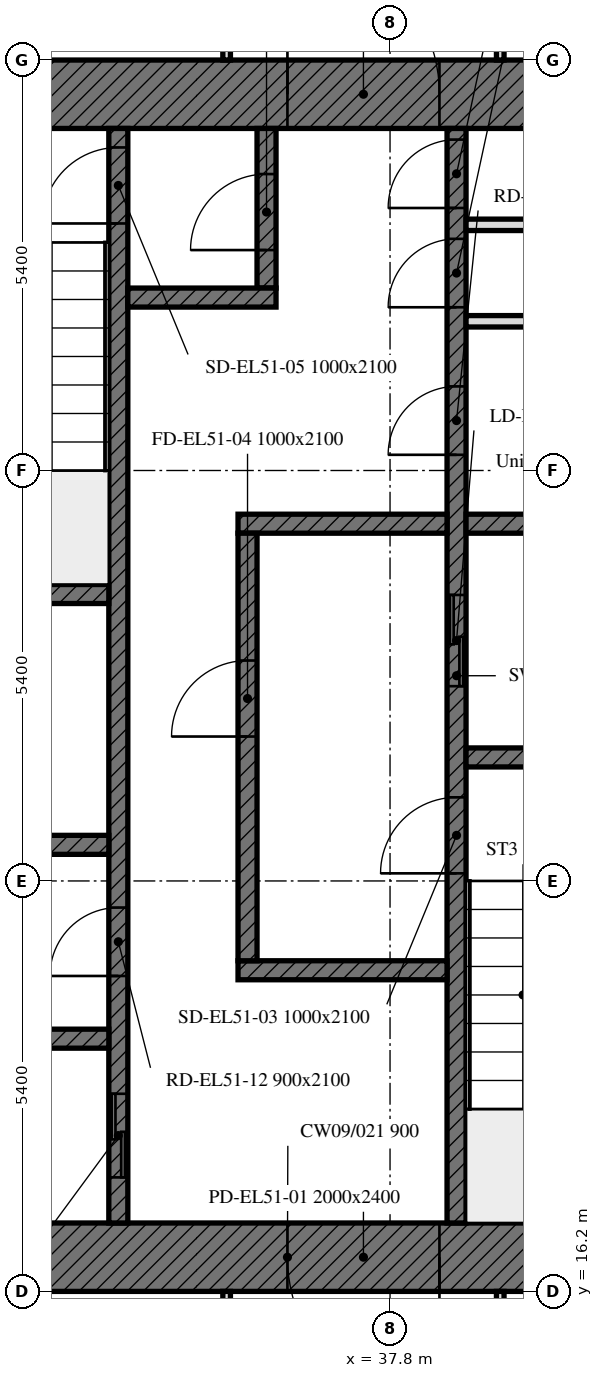
"""IFC4 building model, lengths in metres.
Left out: names, types, materials, properties, quantities, classifications, styles, units other than length and angle.
Written with IfcOpenShell. Run it as: python <this file> out.ifc"""

import sys

from ifc_helpers import new_model, si_unit, direction, frame, frame_2d, origin, place, context, subcontext, project, spatial, rectangle, extrude, element, fill, save


model = new_model("IFC4")
c1 = context("Model", 3, precision=1e-05, world=origin(), true_north=direction((0.0, 1.0)))
c2 = subcontext(c1, "Body", "Model", "MODEL_VIEW")
j1 = project(units=[si_unit("LENGTHUNIT", "METRE"), si_unit("PLANEANGLEUNIT", "RADIAN")], contexts=[c1])
p1 = place(None, origin())
s1 = spatial("IfcSite", under=j1, at=p1, CompositionType="ELEMENT")
p2 = place(p1, origin())
s2 = spatial("IfcBuilding", under=s1, at=p2, CompositionType="ELEMENT")
p3 = place(p2, frame((0.0, 0.0, 207.1)))
s3 = spatial("IfcBuildingStorey", under=s2, at=p3, CompositionType="ELEMENT", Elevation=207.1)
p4 = place(p3, frame((42.0, 16.65, 0.0), z_axis=(0.0, 0.0, 1.0), x_axis=(-1.0, 0.0, 0.0)))
e1 = element("IfcWall", 1, at=p4, inside=s3, PredefinedType="SOLIDWALL", context=c2, shape_type="SweptSolid", body=[
    extrude(rectangle(XDim=11.1, YDim=0.9, at=frame_2d((5.55, 0.0))), origin(), (0.0, 0.0, 1.0), 3.0),
])
p5 = place(p4, frame((3.55, 0.0, 0.0)))
e2 = element("IfcOpeningElement", 2, at=p5, cuts=e1, PredefinedType="OPENING", context=c2, shape_type="SweptSolid", body=[
    extrude(rectangle(XDim=2.0, YDim=2.4, at=frame_2d((1.0, 1.2))), frame((0.0, 0.45, 0.0), z_axis=(0.0, -1.0, 0.0), x_axis=(1.0, 0.0, 0.0)), (0.0, 0.0, 1.0), 0.9),
])
p6 = place(p3, frame((30.9, 31.95, 0.0), z_axis=(0.0, 0.0, 1.0), x_axis=(1.0, 0.0, 0.0)))
e3 = element("IfcWall", 3, at=p6, inside=s3, PredefinedType="SOLIDWALL", context=c2, shape_type="SweptSolid", body=[
    extrude(rectangle(XDim=11.1, YDim=0.9, at=frame_2d((5.55, 0.0))), origin(), (0.0, 0.0, 1.0), 3.0),
])
p7 = place(p6, frame((5.55, 0.0, 0.0)))
e4 = element("IfcOpeningElement", 4, at=p7, cuts=e3, PredefinedType="OPENING", context=c2, shape_type="SweptSolid", body=[
    extrude(rectangle(XDim=2.0, YDim=2.4, at=frame_2d((1.0, 1.2))), frame((0.0, 0.45, 0.0), z_axis=(0.0, -1.0, 0.0), x_axis=(1.0, 0.0, 0.0)), (0.0, 0.0, 1.0), 0.9),
])
p8 = place(p3, frame((38.675, 17.1, 0.0), z_axis=(0.0, 0.0, 1.0), x_axis=(0.0, 1.0, 0.0)))
e5 = element("IfcWall", 5, at=p8, inside=s3, PredefinedType="SOLIDWALL", context=c2, shape_type="SweptSolid", body=[
    extrude(rectangle(XDim=14.4, YDim=0.25, at=frame_2d((7.2, 0.0))), origin(), (0.0, 0.0, 1.0), 3.0),
])
p9 = place(p8, frame((4.6, 0.0, 0.0)))
e6 = element("IfcOpeningElement", 6, at=p9, cuts=e5, PredefinedType="OPENING", context=c2, shape_type="SweptSolid", body=[
    extrude(rectangle(XDim=1.0, YDim=2.1, at=frame_2d((0.5, 1.05))), frame((0.0, 0.125, 0.0), z_axis=(0.0, -1.0, 0.0), x_axis=(1.0, 0.0, 0.0)), (0.0, 0.0, 1.0), 0.25),
])
p10 = place(p8, frame((7.062, 0.0, 0.0)))
e7 = element("IfcOpeningElement", 7, at=p10, cuts=e5, PredefinedType="OPENING", context=c2, shape_type="SweptSolid", body=[
    extrude(rectangle(XDim=1.2, YDim=2.1, at=frame_2d((0.6, 1.05))), frame((0.0, 0.125, 0.0), z_axis=(0.0, -1.0, 0.0), x_axis=(1.0, 0.0, 0.0)), (0.0, 0.0, 1.0), 0.25),
])
p11 = place(p8, frame((10.106, 0.0, 0.0)))
e8 = element("IfcOpeningElement", 8, at=p11, cuts=e5, PredefinedType="OPENING", context=c2, shape_type="SweptSolid", body=[
    extrude(rectangle(XDim=0.9, YDim=2.1, at=frame_2d((0.45, 1.05))), frame((0.0, 0.125, 0.0), z_axis=(0.0, -1.0, 0.0), x_axis=(1.0, 0.0, 0.0)), (0.0, 0.0, 1.0), 0.25),
])
p12 = place(p8, frame((12.048, 0.0, 0.0)))
e9 = element("IfcOpeningElement", 9, at=p12, cuts=e5, PredefinedType="OPENING", context=c2, shape_type="SweptSolid", body=[
    extrude(rectangle(XDim=0.9, YDim=2.1, at=frame_2d((0.45, 1.05))), frame((0.0, 0.125, 0.0), z_axis=(0.0, -1.0, 0.0), x_axis=(1.0, 0.0, 0.0)), (0.0, 0.0, 1.0), 0.25),
])
p13 = place(p8, frame((13.354, 0.0, 0.0)))
e10 = element("IfcOpeningElement", 10, at=p13, cuts=e5, PredefinedType="OPENING", context=c2, shape_type="SweptSolid", body=[
    extrude(rectangle(XDim=0.9, YDim=2.1, at=frame_2d((0.45, 1.05))), frame((0.0, 0.125, 0.0), z_axis=(0.0, -1.0, 0.0), x_axis=(1.0, 0.0, 0.0)), (0.0, 0.0, 1.0), 0.25),
])
p14 = place(p3, frame((34.225, 17.1, 0.0), z_axis=(0.0, 0.0, 1.0), x_axis=(0.0, 1.0, 0.0)))
e11 = element("IfcWall", 11, at=p14, inside=s3, PredefinedType="SOLIDWALL", context=c2, shape_type="SweptSolid", body=[
    extrude(rectangle(XDim=14.4, YDim=0.25, at=frame_2d((7.2, 0.0))), origin(), (0.0, 0.0, 1.0), 3.0),
])
p15 = place(p14, frame((13.15, 0.0, 0.0)))
e12 = element("IfcOpeningElement", 12, at=p15, cuts=e11, PredefinedType="OPENING", context=c2, shape_type="SweptSolid", body=[
    extrude(rectangle(XDim=1.0, YDim=2.1, at=frame_2d((0.5, 1.05))), frame((0.0, 0.125, 0.0), z_axis=(0.0, -1.0, 0.0), x_axis=(1.0, 0.0, 0.0)), (0.0, 0.0, 1.0), 0.25),
])
p16 = place(p14, frame((0.6, 0.0, 0.0)))
e13 = element("IfcOpeningElement", 13, at=p16, cuts=e11, PredefinedType="OPENING", context=c2, shape_type="SweptSolid", body=[
    extrude(rectangle(XDim=1.1, YDim=2.1, at=frame_2d((0.55, 1.05))), frame((0.0, 0.125, 0.0), z_axis=(0.0, -1.0, 0.0), x_axis=(1.0, 0.0, 0.0)), (0.0, 0.0, 1.0), 0.25),
])
p17 = place(p14, frame((3.25, 0.0, 0.0)))
e14 = element("IfcOpeningElement", 14, at=p17, cuts=e11, PredefinedType="OPENING", context=c2, shape_type="SweptSolid", body=[
    extrude(rectangle(XDim=0.9, YDim=2.1, at=frame_2d((0.45, 1.05))), frame((0.0, 0.125, 0.0), z_axis=(0.0, -1.0, 0.0), x_axis=(1.0, 0.0, 0.0)), (0.0, 0.0, 1.0), 0.25),
])
p18 = place(p3, frame((38.8, 23.225, 0.0), z_axis=(0.0, 0.0, 1.0), x_axis=(1.0, 0.0, 0.0)))
e15 = element("IfcWall", 15, at=p18, inside=s3, PredefinedType="SOLIDWALL", context=c2, shape_type="SweptSolid", body=[
    extrude(rectangle(XDim=3.2, YDim=0.25, at=frame_2d((1.6, 0.0))), origin(), (0.0, 0.0, 1.0), 3.0),
])
for number, where, z_axis, x_axis in (
    (16, (30.9, 25.375, 0.0), (0.0, 0.0, 1.0), (1.0, 0.0, 0.0)),
    (17, (30.9, 22.075, 0.0), (0.0, 0.0, 1.0), (1.0, 0.0, 0.0)),
):
    element("IfcWall", number, at=place(p3, frame(where, z_axis=z_axis, x_axis=x_axis)), inside=s3, PredefinedType="SOLIDWALL", context=c2, shape_type="SweptSolid", body=[
        extrude(rectangle(XDim=3.2, YDim=0.25, at=frame_2d((1.6, 0.0))), origin(), (0.0, 0.0, 1.0), 3.0),
    ])
p19 = place(p3, frame((38.8, 26.3, 0.0), z_axis=(0.0, 0.0, 1.0), x_axis=(1.0, 0.0, 0.0)))
e18 = element("IfcWall", 18, at=p19, inside=s3, PredefinedType="SOLIDWALL", context=c2, shape_type="SweptSolid", body=[
    extrude(rectangle(XDim=3.2, YDim=0.25, at=frame_2d((1.6, 0.0))), origin(), (0.0, 0.0, 1.0), 3.0),
])
for number, where, z_axis, x_axis in (
    (19, (35.8, 26.3, 0.0), (0.0, 0.0, 1.0), (1.0, 0.0, 0.0)),
    (20, (35.8, 20.425, 0.0), (0.0, 0.0, 1.0), (1.0, 0.0, 0.0)),
):
    element("IfcWall", number, at=place(p3, frame(where, z_axis=z_axis, x_axis=x_axis)), inside=s3, PredefinedType="SOLIDWALL", context=c2, shape_type="SweptSolid", body=[
        extrude(rectangle(XDim=2.75, YDim=0.25, at=frame_2d((1.375, 0.0))), origin(), (0.0, 0.0, 1.0), 3.0),
    ])
p20 = place(p3, frame((36.175, 29.4, 0.0), z_axis=(0.0, 0.0, 1.0), x_axis=(0.0, 1.0, 0.0)))
e21 = element("IfcWall", 21, at=p20, inside=s3, PredefinedType="SOLIDWALL", context=c2, shape_type="SweptSolid", body=[
    extrude(rectangle(XDim=2.1, YDim=0.25, at=frame_2d((1.05, 0.0))), origin(), (0.0, 0.0, 1.0), 3.0),
])
p21 = place(p20, frame((0.5, 0.0, 0.0)))
e22 = element("IfcOpeningElement", 22, at=p21, cuts=e21, PredefinedType="OPENING", context=c2, shape_type="SweptSolid", body=[
    extrude(rectangle(XDim=1.0, YDim=2.1, at=frame_2d((0.5, 1.05))), frame((0.0, 0.125, 0.0), z_axis=(0.0, -1.0, 0.0), x_axis=(1.0, 0.0, 0.0)), (0.0, 0.0, 1.0), 0.25),
])
p22 = place(p3, frame((34.35, 29.275, 0.0), z_axis=(0.0, 0.0, 1.0), x_axis=(1.0, 0.0, 0.0)))
e23 = element("IfcWall", 23, at=p22, inside=s3, PredefinedType="SOLIDWALL", context=c2, shape_type="SweptSolid", body=[
    extrude(rectangle(XDim=1.95, YDim=0.25, at=frame_2d((0.975, 0.0))), origin(), (0.0, 0.0, 1.0), 3.0),
])
p23 = place(p3, frame((35.925, 20.55, 0.0), z_axis=(0.0, 0.0, 1.0), x_axis=(0.0, 1.0, 0.0)))
e24 = element("IfcWall", 24, at=p23, inside=s3, PredefinedType="SOLIDWALL", context=c2, shape_type="SweptSolid", body=[
    extrude(rectangle(XDim=5.625, YDim=0.25, at=frame_2d((2.812, 0.0))), origin(), (0.0, 0.0, 1.0), 3.0),
])
p24 = place(p23, frame((2.95, 0.0, 0.0)))
e25 = element("IfcOpeningElement", 25, at=p24, cuts=e24, PredefinedType="OPENING", context=c2, shape_type="SweptSolid", body=[
    extrude(rectangle(XDim=1.0, YDim=2.1, at=frame_2d((0.5, 1.05))), frame((0.0, 0.125, 0.0), z_axis=(0.0, -1.0, 0.0), x_axis=(1.0, 0.0, 0.0)), (0.0, 0.0, 1.0), 0.25),
])
p25 = place(p3, frame((30.9, 19.525, 0.0), z_axis=(0.0, 0.0, 1.0), x_axis=(1.0, 0.0, 0.0)))
e26 = element("IfcWall", 26, at=p25, inside=s3, PredefinedType="SOLIDWALL", context=c2, shape_type="SweptSolid", body=[
    extrude(rectangle(XDim=3.2, YDim=0.25, at=frame_2d((1.6, 0.0))), origin(), (0.0, 0.0, 1.0), 3.0),
])
for number, where, z_axis, x_axis in (
    (27, (38.8, 28.963, 0.0), (0.0, 0.0, 1.0), (1.0, 0.0, 0.0)),
    (28, (38.8, 30.232, 0.0), (0.0, 0.0, 1.0), (1.0, 0.0, 0.0)),
):
    element("IfcWall", number, at=place(p3, frame(where, z_axis=z_axis, x_axis=x_axis)), inside=s3, PredefinedType="PARTITIONING", context=c2, shape_type="SweptSolid", body=[
        extrude(rectangle(XDim=3.2, YDim=0.15, at=frame_2d((1.6, 0.0))), origin(), (0.0, 0.0, 1.0), 3.0),
    ])
for number, where, z_axis, x_axis in (
    (29, (39.25, 32.4, 0.0), (0.0, 0.0, 1.0), (0.0, 1.0, 0.0)),
    (30, (35.65, 38.175, 0.0), (0.0, 0.0, 1.0), (0.0, -1.0, 0.0)),
):
    element("IfcWall", number, at=place(p3, frame(where, z_axis=z_axis, x_axis=x_axis)), inside=s3, PredefinedType="PARTITIONING", context=c2, shape_type="SweptSolid", body=[
        extrude(rectangle(XDim=5.775, YDim=0.1, at=frame_2d((2.888, 0.0))), origin(), (0.0, 0.0, 1.0), 3.0),
    ])
for number, where, z_axis, x_axis in (
    (31, (35.65, 16.2, 0.0), (0.0, 0.0, 1.0), (0.0, -1.0, 0.0)),
    (32, (39.25, 13.575, 0.0), (0.0, 0.0, 1.0), (0.0, 1.0, 0.0)),
):
    element("IfcWall", number, at=place(p3, frame(where, z_axis=z_axis, x_axis=x_axis)), inside=s3, PredefinedType="PARTITIONING", context=c2, shape_type="SweptSolid", body=[
        extrude(rectangle(XDim=2.625, YDim=0.1, at=frame_2d((1.312, 0.0))), origin(), (0.0, 0.0, 1.0), 3.0),
    ])
p26 = place(p5, origin())
e33 = element("IfcDoor", 33, at=p26, inside=s3, OperationType="DOUBLE_DOOR_SINGLE_SWING", PredefinedType="DOOR", context=c2, shape_type="SweptSolid", body=[
    extrude(rectangle(XDim=2.0, YDim=2.4, at=frame_2d((1.0, 1.2))), frame((0.0, 0.025, 0.0), z_axis=(0.0, -1.0, 0.0), x_axis=(1.0, 0.0, 0.0)), (0.0, 0.0, 1.0), 0.05),
])
fill(e2, e33)
p27 = place(p7, origin())
e34 = element("IfcDoor", 34, at=p27, inside=s3, OperationType="DOUBLE_DOOR_SINGLE_SWING", PredefinedType="DOOR", context=c2, shape_type="SweptSolid", body=[
    extrude(rectangle(XDim=2.0, YDim=2.4, at=frame_2d((1.0, 1.2))), frame((0.0, 0.025, 0.0), z_axis=(0.0, -1.0, 0.0), x_axis=(1.0, 0.0, 0.0)), (0.0, 0.0, 1.0), 0.05),
])
fill(e4, e34)
p28 = place(p9, origin())
e35 = element("IfcDoor", 35, at=p28, inside=s3, OperationType="SINGLE_SWING_LEFT", PredefinedType="DOOR", context=c2, shape_type="SweptSolid", body=[
    extrude(rectangle(XDim=1.0, YDim=2.1, at=frame_2d((0.5, 1.05))), frame((0.0, 0.025, 0.0), z_axis=(0.0, -1.0, 0.0), x_axis=(1.0, 0.0, 0.0)), (0.0, 0.0, 1.0), 0.05),
])
fill(e6, e35)
p29 = place(p24, origin())
e36 = element("IfcDoor", 36, at=p29, inside=s3, OperationType="SINGLE_SWING_LEFT", PredefinedType="DOOR", context=c2, shape_type="SweptSolid", body=[
    extrude(rectangle(XDim=1.0, YDim=2.1, at=frame_2d((0.5, 1.05))), frame((0.0, 0.025, 0.0), z_axis=(0.0, -1.0, 0.0), x_axis=(1.0, 0.0, 0.0)), (0.0, 0.0, 1.0), 0.05),
])
fill(e25, e36)
p30 = place(p15, origin())
e37 = element("IfcDoor", 37, at=p30, inside=s3, OperationType="SINGLE_SWING_LEFT", PredefinedType="DOOR", context=c2, shape_type="SweptSolid", body=[
    extrude(rectangle(XDim=1.0, YDim=2.1, at=frame_2d((0.5, 1.05))), frame((0.0, 0.025, 0.0), z_axis=(0.0, -1.0, 0.0), x_axis=(1.0, 0.0, 0.0)), (0.0, 0.0, 1.0), 0.05),
])
fill(e12, e37)
p31 = place(p21, origin())
e38 = element("IfcDoor", 38, at=p31, inside=s3, OperationType="SINGLE_SWING_LEFT", PredefinedType="DOOR", context=c2, shape_type="SweptSolid", body=[
    extrude(rectangle(XDim=1.0, YDim=2.1, at=frame_2d((0.5, 1.05))), frame((0.0, 0.025, 0.0), z_axis=(0.0, -1.0, 0.0), x_axis=(1.0, 0.0, 0.0)), (0.0, 0.0, 1.0), 0.05),
])
fill(e22, e38)
p32 = place(p10, origin())
e39 = element("IfcDoor", 39, at=p32, inside=s3, OperationType="DOUBLE_DOOR_SLIDING", PredefinedType="DOOR", context=c2, shape_type="SweptSolid", body=[
    extrude(rectangle(XDim=1.2, YDim=2.1, at=frame_2d((0.6, 1.05))), frame((0.0, 0.025, 0.0), z_axis=(0.0, -1.0, 0.0), x_axis=(1.0, 0.0, 0.0)), (0.0, 0.0, 1.0), 0.05),
])
fill(e7, e39)
p33 = place(p16, origin())
e40 = element("IfcDoor", 40, at=p33, inside=s3, OperationType="DOUBLE_DOOR_SLIDING", PredefinedType="DOOR", context=c2, shape_type="SweptSolid", body=[
    extrude(rectangle(XDim=1.1, YDim=2.1, at=frame_2d((0.55, 1.05))), frame((0.0, 0.025, 0.0), z_axis=(0.0, -1.0, 0.0), x_axis=(1.0, 0.0, 0.0)), (0.0, 0.0, 1.0), 0.05),
])
fill(e13, e40)
p34 = place(p11, origin())
e41 = element("IfcDoor", 41, at=p34, inside=s3, OperationType="SINGLE_SWING_LEFT", PredefinedType="DOOR", context=c2, shape_type="SweptSolid", body=[
    extrude(rectangle(XDim=0.9, YDim=2.1, at=frame_2d((0.45, 1.05))), frame((0.0, 0.025, 0.0), z_axis=(0.0, -1.0, 0.0), x_axis=(1.0, 0.0, 0.0)), (0.0, 0.0, 1.0), 0.05),
])
fill(e8, e41)
p35 = place(p12, origin())
e42 = element("IfcDoor", 42, at=p35, inside=s3, OperationType="SINGLE_SWING_LEFT", PredefinedType="DOOR", context=c2, shape_type="SweptSolid", body=[
    extrude(rectangle(XDim=0.9, YDim=2.1, at=frame_2d((0.45, 1.05))), frame((0.0, 0.025, 0.0), z_axis=(0.0, -1.0, 0.0), x_axis=(1.0, 0.0, 0.0)), (0.0, 0.0, 1.0), 0.05),
])
fill(e9, e42)
p36 = place(p13, origin())
e43 = element("IfcDoor", 43, at=p36, inside=s3, OperationType="SINGLE_SWING_LEFT", PredefinedType="DOOR", context=c2, shape_type="SweptSolid", body=[
    extrude(rectangle(XDim=0.9, YDim=2.1, at=frame_2d((0.45, 1.05))), frame((0.0, 0.025, 0.0), z_axis=(0.0, -1.0, 0.0), x_axis=(1.0, 0.0, 0.0)), (0.0, 0.0, 1.0), 0.05),
])
fill(e10, e43)
p37 = place(p17, origin())
e44 = element("IfcDoor", 44, at=p37, inside=s3, OperationType="SINGLE_SWING_LEFT", PredefinedType="DOOR", context=c2, shape_type="SweptSolid", body=[
    extrude(rectangle(XDim=0.9, YDim=2.1, at=frame_2d((0.45, 1.05))), frame((0.0, 0.025, 0.0), z_axis=(0.0, -1.0, 0.0), x_axis=(1.0, 0.0, 0.0)), (0.0, 0.0, 1.0), 0.05),
])
fill(e14, e44)
save(model, sys.argv[1])
